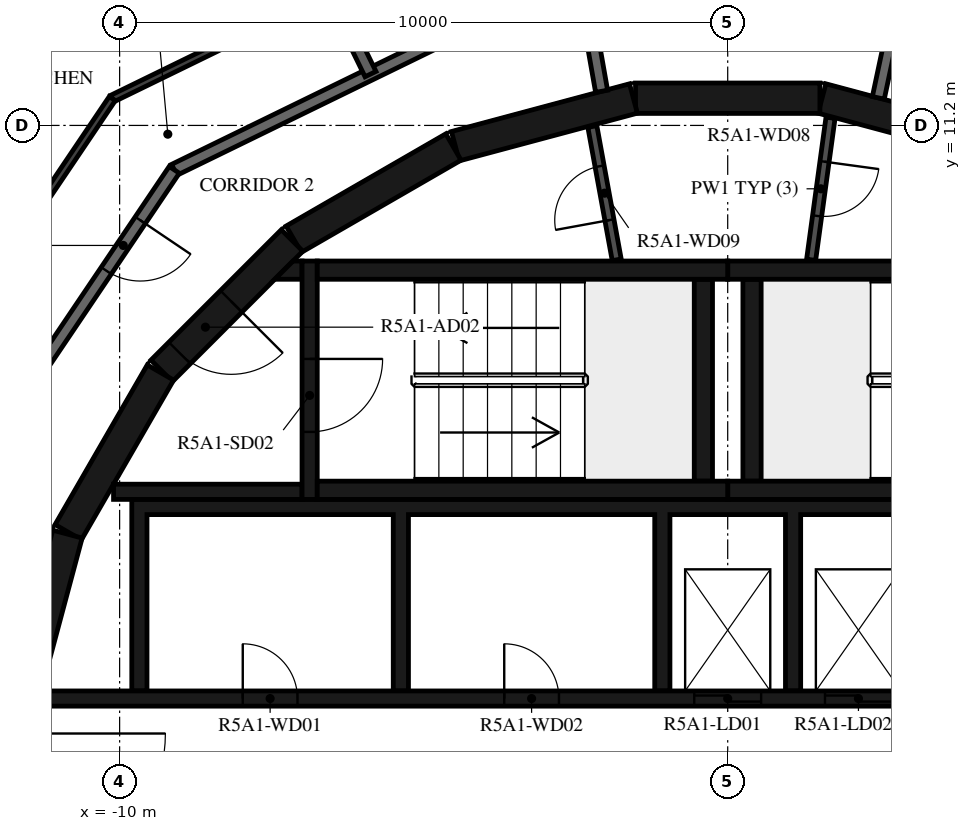
"""IFC4 building model, lengths in metres.
Left out: names, types, materials, properties, quantities, classifications, styles, units other than length and angle.
Written with IfcOpenShell. Run it as: python <this file> out.ifc"""

import sys

from ifc_helpers import new_model, si_unit, direction, frame, frame_2d, origin, place, context, subcontext, project, spatial, polyline, rectangle, outline, extrude, element, fill, save


model = new_model("IFC4")
c1 = context("Model", 3, precision=1e-05, world=origin(), true_north=direction((0.0, 1.0)))
c2 = subcontext(c1, "Body", "Model", "MODEL_VIEW")
j1 = project(units=[si_unit("LENGTHUNIT", "METRE"), si_unit("PLANEANGLEUNIT", "RADIAN")], contexts=[c1])
p1 = place(None, origin())
s1 = spatial("IfcSite", under=j1, at=p1, CompositionType="ELEMENT")
p2 = place(p1, origin())
s2 = spatial("IfcBuilding", under=s1, at=p2, CompositionType="ELEMENT")
p3 = place(p2, frame((0.0, 0.0, 191.9)))
s3 = spatial("IfcBuildingStorey", under=s2, at=p3, CompositionType="ELEMENT", Elevation=191.9)
for number, where, z_axis, x_axis in (
    (1, (4.479, 10.858, 0.0), (0.0, 0.0, 1.0), (-0.966, 0.259, 0.0)),
    (2, (1.516, 11.647, 0.0), (0.0, 0.0, 1.0), (-1.0, 0.0, 0.0)),
    (3, (-1.55, 11.643, 0.0), (0.0, 0.0, 1.0), (-0.966, -0.259, 0.0)),
    (4, (-4.51, 10.845, 0.0), (0.0, 0.0, 1.0), (-0.866, -0.5, 0.0)),
):
    element("IfcWall", number, at=place(p3, frame(where, z_axis=z_axis, x_axis=x_axis)), inside=s3, PredefinedType="SHEAR", context=c2, shape_type="SweptSolid", body=[
        extrude(rectangle(XDim=3.033, YDim=0.5, at=frame_2d((1.516, 0.0))), origin(), (0.0, 0.0, 1.0), 3.12),
    ])
p4 = place(p3, frame((-7.164, 9.308, 0.0), z_axis=(0.0, 0.0, 1.0), x_axis=(-0.707106781187, -0.707106781187, 0.0)))
e5 = element("IfcWall", 5, at=p4, inside=s3, PredefinedType="SHEAR", context=c2, shape_type="SweptSolid", body=[
    extrude(rectangle(XDim=3.032, YDim=0.5, at=frame_2d((1.516, 0.0))), origin(), (0.0, 0.0, 1.0), 3.12),
])
p5 = place(p4, frame((1.416, 0.0, 0.0)))
e6 = element("IfcOpeningElement", 6, at=p5, cuts=e5, PredefinedType="OPENING", context=c2, shape_type="SweptSolid", body=[
    extrude(rectangle(XDim=1.2, YDim=2.1, at=frame_2d((0.6, 1.05))), frame((0.0, 0.26, 0.0), z_axis=(0.0, -1.0, 0.0), x_axis=(1.0, 0.0, 0.0)), (0.0, 0.0, 1.0), 0.52),
])
for number, where, z_axis, x_axis in (
    (7, (-9.329, 7.137, 0.0), (0.0, 0.0, 1.0), (-0.5, -0.866, 0.0)),
    (8, (-10.858, 4.479, 0.0), (0.0, 0.0, 1.0), (-0.259, -0.966, 0.0)),
):
    element("IfcWall", number, at=place(p3, frame(where, z_axis=z_axis, x_axis=x_axis)), inside=s3, PredefinedType="SHEAR", context=c2, shape_type="SweptSolid", body=[
        extrude(rectangle(XDim=3.033, YDim=0.5, at=frame_2d((1.516, 0.0))), origin(), (0.0, 0.0, 1.0), 3.12),
    ])
for number, where, z_axis, x_axis in (
    (9, (0.0, 5.2, 0.0), (0.0, 0.0, 1.0), (1.0, 0.0, 0.0)),
    (10, (0.0, 8.82, 0.0), (0.0, 0.0, 1.0), (1.0, 0.0, 0.0)),
):
    element("IfcWall", number, at=place(p3, frame(where, z_axis=z_axis, x_axis=x_axis)), inside=s3, PredefinedType="SHEAR", context=c2, shape_type="SweptSolid", body=[
        extrude(rectangle(XDim=6.75, YDim=0.3, at=frame_2d((3.375, 0.0))), origin(), (0.0, 0.0, 1.0), 3.12),
    ])
p6 = place(p3, frame((0.4, 5.35, 0.0), z_axis=(0.0, 0.0, 1.0), x_axis=(0.0, 1.0, 0.0)))
e11 = element("IfcWall", 11, at=p6, inside=s3, PredefinedType="SHEAR", context=c2, shape_type="SweptSolid", body=[
    extrude(rectangle(XDim=3.32, YDim=0.3, at=frame_2d((1.66, 0.0))), origin(), (0.0, 0.0, 1.0), 3.12),
])
for number, where, z_axis, x_axis in (
    (12, (-6.75, 5.2, 0.0), (0.0, 0.0, 1.0), (1.0, 0.0, 0.0)),
    (13, (-6.75, 8.82, 0.0), (0.0, 0.0, 1.0), (1.0, 0.0, 0.0)),
):
    element("IfcWall", number, at=place(p3, frame(where, z_axis=z_axis, x_axis=x_axis)), inside=s3, PredefinedType="SHEAR", context=c2, shape_type="SweptSolid", body=[
        extrude(rectangle(XDim=6.75, YDim=0.3, at=frame_2d((3.375, 0.0))), origin(), (0.0, 0.0, 1.0), 3.12),
    ])
p7 = place(p3, frame((-0.4, 5.35, 0.0), z_axis=(0.0, 0.0, 1.0), x_axis=(0.0, 1.0, 0.0)))
e14 = element("IfcWall", 14, at=p7, inside=s3, PredefinedType="SHEAR", context=c2, shape_type="SweptSolid", body=[
    extrude(rectangle(XDim=3.32, YDim=0.3, at=frame_2d((1.66, 0.0))), origin(), (0.0, 0.0, 1.0), 3.12),
])
p8 = place(p3, frame((-6.875, 8.97, 0.0), z_axis=(0.0, 0.0, 1.0), x_axis=(0.0, -1.0, 0.0)))
e15 = element("IfcWall", 15, at=p8, inside=s3, PredefinedType="SHEAR", context=c2, shape_type="SweptSolid", body=[
    extrude(rectangle(XDim=3.92, YDim=0.25, at=frame_2d((1.96, 0.0))), origin(), (0.0, 0.0, 1.0), 3.12),
])
p9 = place(p8, frame((1.61, 0.0, 0.0)))
e16 = element("IfcOpeningElement", 16, at=p9, cuts=e15, PredefinedType="OPENING", context=c2, shape_type="SweptSolid", body=[
    extrude(rectangle(XDim=1.2, YDim=2.1, at=frame_2d((0.6, 1.05))), frame((0.0, 0.135, 0.0), z_axis=(0.0, -1.0, 0.0), x_axis=(1.0, 0.0, 0.0)), (0.0, 0.0, 1.0), 0.27),
])
p10 = place(p3, frame((-7.0, 5.175, 0.0), z_axis=(0.0, 0.0, 1.0), x_axis=(-1.0, 0.0, 0.0)))
e17 = element("IfcWall", 17, at=p10, inside=s3, PredefinedType="SHEAR", context=c2, shape_type="SweptSolid", body=[
    extrude(rectangle(XDim=3.1, YDim=0.25, at=frame_2d((1.55, 0.0))), origin(), (0.0, 0.0, 1.0), 3.12),
])
p11 = place(p3, origin())
e18 = element("IfcWall", 18, at=p11, inside=s3, PredefinedType="SHEAR", context=c2, shape_type="SweptSolid", body=[
    extrude(outline(polyline([(-7.148, 8.97), (-7.0, 8.97), (-7.0, 8.67), (-7.448, 8.67), (-7.148, 8.97)])), origin(), (0.0, 0.0, 1.0), 3.12),
])
p12 = place(p3, origin())
e19 = element("IfcWall", 19, at=p12, inside=s3, PredefinedType="SHEAR", context=c2, shape_type="SweptSolid", body=[
    extrude(outline(polyline([(-9.55, 4.8), (-5.5, 4.8), (-5.5, 1.9), (-5.25, 1.9), (-5.25, 4.8), (-1.2, 4.8), (-1.2, 1.9), (-0.95, 1.9), (-0.95, 4.8), (0.95, 4.8), (0.95, 1.9), (1.2, 1.9), (1.2, 4.8), (3.1, 4.8), (3.1, 1.9), (3.35, 1.9), (3.35, 4.8), (5.25, 4.8), (5.25, 1.9), (5.5, 1.9), (5.5, 4.8), (7.4, 4.8), (7.4, 1.9), (7.65, 1.9), (7.65, 4.8), (9.55, 4.8), (9.55, 1.9), (9.8, 1.9), (9.8, 4.8), (9.8, 5.05), (-9.8, 5.05), (-9.8, 4.8), (-9.8, 1.9), (-9.55, 1.9), (-9.55, 4.8)])), origin(), (0.0, 0.0, 1.0), 3.12),
])
p13 = place(p3, frame((-11.28, 1.775, 0.0), z_axis=(0.0, 0.0, 1.0), x_axis=(1.0, 0.0, 0.0)))
e20 = element("IfcWall", 20, at=p13, inside=s3, PredefinedType="SHEAR", context=c2, shape_type="SweptSolid", body=[
    extrude(rectangle(XDim=14.38, YDim=0.25, at=frame_2d((7.19, 0.0))), origin(), (0.0, 0.0, 1.0), 3.12),
])
p14 = place(p13, frame((10.73, 0.0, 0.0)))
e21 = element("IfcOpeningElement", 21, at=p14, cuts=e20, PredefinedType="OPENING", context=c2, shape_type="SweptSolid", body=[
    extrude(rectangle(XDim=1.1, YDim=2.1, at=frame_2d((0.55, 1.05))), frame((0.0, 0.135, 0.0), z_axis=(0.0, -1.0, 0.0), x_axis=(1.0, 0.0, 0.0)), (0.0, 0.0, 1.0), 0.27),
])
p15 = place(p13, frame((12.88, 0.0, 0.0)))
e22 = element("IfcOpeningElement", 22, at=p15, cuts=e20, PredefinedType="OPENING", context=c2, shape_type="SweptSolid", body=[
    extrude(rectangle(XDim=1.1, YDim=2.1, at=frame_2d((0.55, 1.05))), frame((0.0, 0.135, 0.0), z_axis=(0.0, -1.0, 0.0), x_axis=(1.0, 0.0, 0.0)), (0.0, 0.0, 1.0), 0.27),
])
p16 = place(p13, frame((3.305, 0.0, 0.0)))
e23 = element("IfcOpeningElement", 23, at=p16, cuts=e20, PredefinedType="OPENING", context=c2, shape_type="SweptSolid", body=[
    extrude(rectangle(XDim=0.9, YDim=2.1, at=frame_2d((0.45, 1.05))), frame((0.0, 0.135, 0.0), z_axis=(0.0, -1.0, 0.0), x_axis=(1.0, 0.0, 0.0)), (0.0, 0.0, 1.0), 0.27),
])
p17 = place(p13, frame((7.605, 0.0, 0.0)))
e24 = element("IfcOpeningElement", 24, at=p17, cuts=e20, PredefinedType="OPENING", context=c2, shape_type="SweptSolid", body=[
    extrude(rectangle(XDim=0.9, YDim=2.1, at=frame_2d((0.45, 1.05))), frame((0.0, 0.135, 0.0), z_axis=(0.0, -1.0, 0.0), x_axis=(1.0, 0.0, 0.0)), (0.0, 0.0, 1.0), 0.27),
])
p18 = place(p3, frame((1.691, 11.326, 0.0), z_axis=(0.0, 0.0, 1.0), x_axis=(-0.135344253201, -0.990798633994, 0.0)))
e25 = element("IfcWall", 25, at=p18, inside=s3, PredefinedType="PARTITIONING", context=c2, shape_type="SweptSolid", body=[
    extrude(rectangle(XDim=2.358, YDim=0.15, at=frame_2d((1.179, 0.0))), origin(), (0.0, 0.0, 1.0), 3.12),
])
p19 = place(p18, frame((0.729, 0.0, 0.0)))
e26 = element("IfcOpeningElement", 26, at=p19, cuts=e25, PredefinedType="OPENING", context=c2, shape_type="SweptSolid", body=[
    extrude(rectangle(XDim=0.9, YDim=2.1, at=frame_2d((0.45, 1.05))), frame((0.0, 0.085, 0.0), z_axis=(0.0, -1.0, 0.0), x_axis=(1.0, 0.0, 0.0)), (0.0, 0.0, 1.0), 0.17),
])
p20 = place(p3, frame((-1.825, 8.99, 0.0), z_axis=(0.0, 0.0, 1.0), x_axis=(-0.179955206115, 0.983674805915, 0.0)))
e27 = element("IfcWall", 27, at=p20, inside=s3, PredefinedType="PARTITIONING", context=c2, shape_type="SweptSolid", body=[
    extrude(rectangle(XDim=2.229, YDim=0.15, at=frame_2d((1.115, 0.0))), origin(), (0.0, 0.0, 1.0), 3.12),
])
p21 = place(p20, frame((0.665, 0.0, 0.0)))
e28 = element("IfcOpeningElement", 28, at=p21, cuts=e27, PredefinedType="OPENING", context=c2, shape_type="SweptSolid", body=[
    extrude(rectangle(XDim=0.9, YDim=2.1, at=frame_2d((0.45, 1.05))), frame((0.0, 0.085, 0.0), z_axis=(0.0, -1.0, 0.0), x_axis=(1.0, 0.0, 0.0)), (0.0, 0.0, 1.0), 0.17),
])
p22 = place(p3, frame((2.813, 13.236, 0.0), z_axis=(0.0, 0.0, 1.0), x_axis=(-0.207911086063, -0.978147729278, 0.0)))
e29 = element("IfcWall", 29, at=p22, inside=s3, PredefinedType="STANDARD", context=c2, shape_type="SweptSolid", body=[
    extrude(rectangle(XDim=1.618, YDim=0.2, at=frame_2d((0.809, 0.0))), origin(), (0.0, 0.0, 1.0), 3.12),
])
p23 = place(p3, frame((-2.074, 11.761, 0.0), z_axis=(0.0, 0.0, 1.0), x_axis=(-0.173740587112, 0.984791454263, 0.0)))
e30 = element("IfcWall", 30, at=p23, inside=s3, PredefinedType="STANDARD", context=c2, shape_type="SweptSolid", body=[
    extrude(rectangle(XDim=1.867, YDim=0.2, at=frame_2d((0.934, 0.0))), origin(), (0.0, 0.0, 1.0), 3.12),
])
p24 = place(p3, frame((-2.647, 13.618, 0.0), z_axis=(0.0, 0.0, 1.0), x_axis=(-0.898796543751, -0.438366026218, 0.0)))
e31 = element("IfcWall", 31, at=p24, inside=s3, PredefinedType="STANDARD", context=c2, shape_type="SweptSolid", body=[
    extrude(rectangle(XDim=7.181, YDim=0.2, at=frame_2d((3.591, 0.0))), origin(), (0.0, 0.0, 1.0), 3.12),
])
p25 = place(p3, frame((-9.101, 10.47, 0.0), z_axis=(0.0, 0.0, 1.0), x_axis=(-0.559195469534, -0.829035841718, 0.0)))
e32 = element("IfcWall", 32, at=p25, inside=s3, PredefinedType="STANDARD", context=c2, shape_type="SweptSolid", body=[
    extrude(rectangle(XDim=7.181, YDim=0.2, at=frame_2d((3.591, 0.0))), origin(), (0.0, 0.0, 1.0), 3.12),
])
p26 = place(p25, frame((1.0, 0.0, 0.0)))
e33 = element("IfcOpeningElement", 33, at=p26, cuts=e32, PredefinedType="OPENING", context=c2, shape_type="SweptSolid", body=[
    extrude(rectangle(XDim=1.0, YDim=2.1, at=frame_2d((0.5, 1.05))), frame((0.0, 0.11, 0.0), z_axis=(0.0, -1.0, 0.0), x_axis=(1.0, 0.0, 0.0)), (0.0, 0.0, 1.0), 0.22),
])
p27 = place(p3, frame((-6.522, 13.373, 0.0), z_axis=(0.0, 0.0, 1.0), x_axis=(0.438277270821, -0.8988398266, 0.0)))
e34 = element("IfcWall", 34, at=p27, inside=s3, PredefinedType="STANDARD", context=c2, shape_type="SweptSolid", body=[
    extrude(rectangle(XDim=1.479, YDim=0.2, at=frame_2d((0.74, 0.0))), origin(), (0.0, 0.0, 1.0), 3.12),
])
p28 = place(p3, frame((-8.405, 12.479, 0.0), z_axis=(0.0, 0.0, 1.0), x_axis=(-0.898784427692, -0.438390867307, 0.0)))
e35 = element("IfcWall", 35, at=p28, inside=s3, PredefinedType="PARTITIONING", context=c2, shape_type="SweptSolid", body=[
    extrude(rectangle(XDim=1.908, YDim=0.12, at=frame_2d((0.954, 0.0))), origin(), (0.0, 0.0, 1.0), 3.12),
])
p29 = place(p3, frame((-10.12, 11.642, 0.0), z_axis=(0.0, 0.0, 1.0), x_axis=(-0.55920080659, -0.829032241779, 0.0)))
e36 = element("IfcWall", 36, at=p29, inside=s3, PredefinedType="PARTITIONING", context=c2, shape_type="SweptSolid", body=[
    extrude(rectangle(XDim=7.985, YDim=0.12, at=frame_2d((3.992, 0.0))), origin(), (0.0, 0.0, 1.0), 3.12),
])
p30 = place(p29, frame((4.346, 0.0, 0.0)))
e37 = element("IfcOpeningElement", 37, at=p30, cuts=e36, PredefinedType="OPENING", context=c2, shape_type="SweptSolid", body=[
    extrude(rectangle(XDim=0.9, YDim=2.1, at=frame_2d((0.45, 1.05))), frame((0.0, 0.07, 0.0), z_axis=(0.0, -1.0, 0.0), x_axis=(1.0, 0.0, 0.0)), (0.0, 0.0, 1.0), 0.14),
])
p31 = place(p9, origin())
e38 = element("IfcDoor", 38, at=p31, inside=s3, OperationType="SINGLE_SWING_LEFT", PredefinedType="DOOR", context=c2, shape_type="SweptSolid", body=[
    extrude(rectangle(XDim=1.2, YDim=2.1, at=frame_2d((0.6, 1.05))), frame((0.0, 0.025, 0.0), z_axis=(0.0, -1.0, 0.0), x_axis=(1.0, 0.0, 0.0)), (0.0, 0.0, 1.0), 0.05),
])
fill(e16, e38)
p32 = place(p5, origin())
e39 = element("IfcDoor", 39, at=p32, inside=s3, OperationType="SINGLE_SWING_RIGHT", PredefinedType="DOOR", context=c2, shape_type="SweptSolid", body=[
    extrude(rectangle(XDim=1.2, YDim=2.1, at=frame_2d((0.6, 1.05))), frame((0.0, 0.025, 0.0), z_axis=(0.0, -1.0, 0.0), x_axis=(1.0, 0.0, 0.0)), (0.0, 0.0, 1.0), 0.05),
])
fill(e6, e39)
p33 = place(p14, origin())
e40 = element("IfcDoor", 40, at=p33, inside=s3, OperationType="DOUBLE_DOOR_SLIDING", PredefinedType="DOOR", context=c2, shape_type="SweptSolid", body=[
    extrude(rectangle(XDim=1.1, YDim=2.1, at=frame_2d((0.55, 1.05))), frame((0.0, 0.025, 0.0), z_axis=(0.0, -1.0, 0.0), x_axis=(1.0, 0.0, 0.0)), (0.0, 0.0, 1.0), 0.05),
])
fill(e21, e40)
p34 = place(p15, origin())
e41 = element("IfcDoor", 41, at=p34, inside=s3, OperationType="DOUBLE_DOOR_SLIDING", PredefinedType="DOOR", context=c2, shape_type="SweptSolid", body=[
    extrude(rectangle(XDim=1.1, YDim=2.1, at=frame_2d((0.55, 1.05))), frame((0.0, 0.025, 0.0), z_axis=(0.0, -1.0, 0.0), x_axis=(1.0, 0.0, 0.0)), (0.0, 0.0, 1.0), 0.05),
])
fill(e22, e41)
p35 = place(p16, origin())
e42 = element("IfcDoor", 42, at=p35, inside=s3, OperationType="SINGLE_SWING_LEFT", PredefinedType="DOOR", context=c2, shape_type="SweptSolid", body=[
    extrude(rectangle(XDim=0.9, YDim=2.1, at=frame_2d((0.45, 1.05))), frame((0.0, 0.025, 0.0), z_axis=(0.0, -1.0, 0.0), x_axis=(1.0, 0.0, 0.0)), (0.0, 0.0, 1.0), 0.05),
])
fill(e23, e42)
p36 = place(p17, origin())
e43 = element("IfcDoor", 43, at=p36, inside=s3, OperationType="SINGLE_SWING_RIGHT", PredefinedType="DOOR", context=c2, shape_type="SweptSolid", body=[
    extrude(rectangle(XDim=0.9, YDim=2.1, at=frame_2d((0.45, 1.05))), frame((0.0, 0.025, 0.0), z_axis=(0.0, -1.0, 0.0), x_axis=(1.0, 0.0, 0.0)), (0.0, 0.0, 1.0), 0.05),
])
fill(e24, e43)
p37 = place(p19, origin())
e44 = element("IfcDoor", 44, at=p37, inside=s3, OperationType="SINGLE_SWING_RIGHT", PredefinedType="DOOR", context=c2, shape_type="SweptSolid", body=[
    extrude(rectangle(XDim=0.9, YDim=2.1, at=frame_2d((0.45, 1.05))), frame((0.0, 0.025, 0.0), z_axis=(0.0, -1.0, 0.0), x_axis=(1.0, 0.0, 0.0)), (0.0, 0.0, 1.0), 0.05),
])
fill(e26, e44)
p38 = place(p21, origin())
e45 = element("IfcDoor", 45, at=p38, inside=s3, OperationType="SINGLE_SWING_LEFT", PredefinedType="DOOR", context=c2, shape_type="SweptSolid", body=[
    extrude(rectangle(XDim=0.9, YDim=2.1, at=frame_2d((0.45, 1.05))), frame((0.0, 0.025, 0.0), z_axis=(0.0, -1.0, 0.0), x_axis=(1.0, 0.0, 0.0)), (0.0, 0.0, 1.0), 0.05),
])
fill(e28, e45)
p39 = place(p26, origin())
e46 = element("IfcDoor", 46, at=p39, inside=s3, OperationType="SINGLE_SWING_LEFT", PredefinedType="DOOR", context=c2, shape_type="SweptSolid", body=[
    extrude(rectangle(XDim=1.0, YDim=2.1, at=frame_2d((0.5, 1.05))), frame((0.0, 0.025, 0.0), z_axis=(0.0, -1.0, 0.0), x_axis=(1.0, 0.0, 0.0)), (0.0, 0.0, 1.0), 0.05),
])
fill(e33, e46)
save(model, sys.argv[1])
